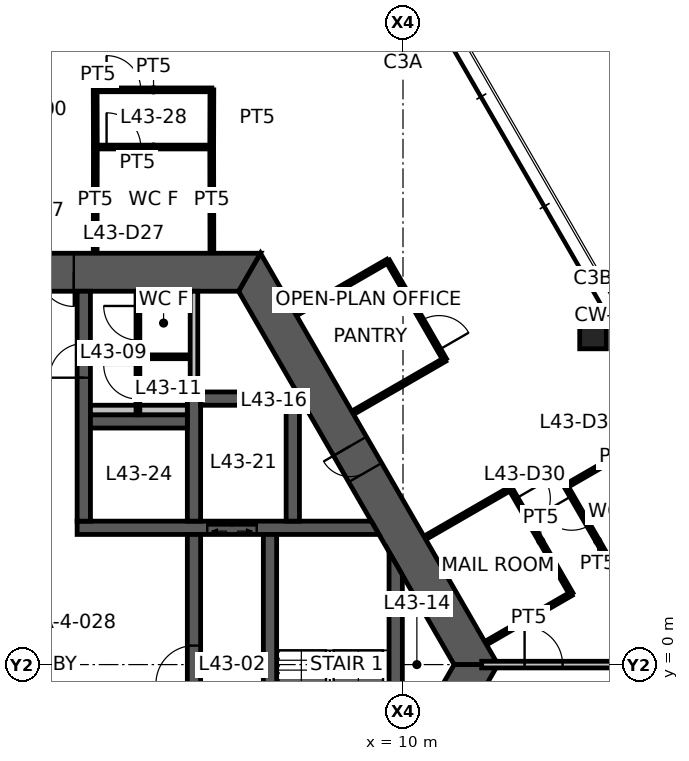
"""IFC4 building model, lengths in metres.
Left out: names, types, materials, properties, quantities, classifications, styles, units other than length and angle.
Written with IfcOpenShell. Run it as: python <this file> out.ifc"""

import sys

from ifc_helpers import new_model, si_unit, direction, frame, frame_2d, origin, origin_2d, place, context, subcontext, project, spatial, polyline, rectangle, hollow_rectangle, outline, extrude, element, fill, save


model = new_model("IFC4")
c1 = context("Model", 3, precision=1e-05, world=origin(), true_north=direction((0.0, 1.0)))
c2 = subcontext(c1, "Body", "Model", "MODEL_VIEW")
j1 = project(units=[si_unit("LENGTHUNIT", "METRE"), si_unit("PLANEANGLEUNIT", "RADIAN")], contexts=[c1])
p1 = place(None, origin())
s1 = spatial("IfcSite", under=j1, at=p1, CompositionType="ELEMENT")
p2 = place(p1, origin())
s2 = spatial("IfcBuilding", under=s1, at=p2, CompositionType="ELEMENT")
p3 = place(p2, frame((0.0, 0.0, 172.1)))
s3 = spatial("IfcBuildingStorey", under=s2, at=p3, CompositionType="ELEMENT", Elevation=172.1)
p4 = place(p3, frame((15.0, 8.66, 0.0), z_axis=(0.0, 0.0, 1.0), x_axis=(1.0, 0.0, 0.0)))
e1 = element("IfcColumn", 1, at=p4, inside=s3, PredefinedType="COLUMN", context=c2, shape_type="SweptSolid", body=[
    extrude(hollow_rectangle(XDim=0.7, YDim=0.7, WallThickness=0.036, at=origin_2d()), origin(), (0.0, 0.0, 1.0), 3.9),
])
p5 = place(p3, frame((11.922, 0.0, 0.0), z_axis=(0.0, 0.0, 1.0), x_axis=(-0.500004296715, 0.866022923061, 0.0)))
e2 = element("IfcWall", 2, at=p5, inside=s3, PredefinedType="SHEAR", context=c2, shape_type="SweptSolid", body=[
    extrude(outline(polyline([(-0.289, -0.5), (5.835, -0.5), (6.635, -0.5), (12.211, -0.5), (11.634, 0.5), (6.635, 0.5), (5.835, 0.5), (0.289, 0.5), (-0.289, -0.5)])), origin(), (0.0, 0.0, 1.0), 3.9),
])
p6 = place(p5, frame((5.835, 0.0, 0.0)))
e3 = element("IfcOpeningElement", 3, at=p6, cuts=e2, PredefinedType="OPENING", context=c2, shape_type="SweptSolid", body=[
    extrude(rectangle(XDim=0.8, YDim=2.1, at=frame_2d((0.4, 1.05))), frame((0.0, 0.51, 0.0), z_axis=(0.0, -1.0, 0.0), x_axis=(1.0, 0.0, 0.0)), (0.0, 0.0, 1.0), 1.02),
])
p7 = place(p3, frame((5.961, 10.325, 0.0), z_axis=(0.0, 0.0, 1.0), x_axis=(-1.0, 0.0, 0.0)))
e4 = element("IfcWall", 4, at=p7, inside=s3, PredefinedType="SHEAR", context=c2, shape_type="SweptSolid", body=[
    extrude(outline(polyline([(-0.289, -0.5), (4.624, -0.5), (5.523, -0.5), (6.399, -0.5), (7.299, -0.5), (12.211, -0.5), (11.634, 0.5), (7.299, 0.5), (6.399, 0.5), (5.523, 0.5), (4.624, 0.5), (0.289, 0.5), (-0.289, -0.5)])), origin(), (0.0, 0.0, 1.0), 3.9),
])
p8 = place(p7, frame((6.399, 0.0, 0.0)))
e5 = element("IfcOpeningElement", 5, at=p8, cuts=e4, PredefinedType="OPENING", context=c2, shape_type="SweptSolid", body=[
    extrude(rectangle(XDim=0.9, YDim=2.1, at=frame_2d((0.45, 1.05))), frame((0.0, 0.51, 0.0), z_axis=(0.0, -1.0, 0.0), x_axis=(1.0, 0.0, 0.0)), (0.0, 0.0, 1.0), 1.02),
])
p9 = place(p7, frame((4.624, 0.0, 0.0)))
e6 = element("IfcOpeningElement", 6, at=p9, cuts=e4, PredefinedType="OPENING", context=c2, shape_type="SweptSolid", body=[
    extrude(rectangle(XDim=0.9, YDim=2.1, at=frame_2d((0.45, 1.05))), frame((0.0, 0.51, 0.0), z_axis=(0.0, -1.0, 0.0), x_axis=(1.0, 0.0, 0.0)), (0.0, 0.0, 1.0), 1.02),
])
p10 = place(p3, frame((5.961, -10.325, 0.0), z_axis=(0.0, 0.0, 1.0), x_axis=(0.500004296715, 0.866022923061, 0.0)))
e7 = element("IfcWall", 7, at=p10, inside=s3, PredefinedType="SHEAR", context=c2, shape_type="SweptSolid", body=[
    extrude(outline(polyline([(-0.289, -0.5), (4.594, -0.5), (5.394, -0.5), (12.211, -0.5), (11.634, 0.5), (5.394, 0.5), (4.594, 0.5), (0.289, 0.5), (-0.289, -0.5)])), origin(), (0.0, 0.0, 1.0), 3.9),
])
p11 = place(p10, frame((4.594, 0.0, 0.0)))
e8 = element("IfcOpeningElement", 8, at=p11, cuts=e7, PredefinedType="OPENING", context=c2, shape_type="SweptSolid", body=[
    extrude(rectangle(XDim=0.8, YDim=2.1, at=frame_2d((0.4, 1.05))), frame((0.0, 0.51, 0.0), z_axis=(0.0, -1.0, 0.0), x_axis=(1.0, 0.0, 0.0)), (0.0, 0.0, 1.0), 1.02),
])
p12 = place(p3, frame((1.425, 3.6, 0.0), z_axis=(0.0, 0.0, 1.0), x_axis=(1.0, 0.0, 0.0)))
e9 = element("IfcWall", 9, at=p12, inside=s3, PredefinedType="SHEAR", context=c2, shape_type="SweptSolid", body=[
    extrude(outline(polyline([(0.0, -0.175), (3.425, -0.175), (4.725, -0.175), (7.942, -0.175), (7.74, 0.175), (4.725, 0.175), (3.425, 0.175), (0.0, 0.175), (0.0, -0.175)])), origin(), (0.0, 0.0, 1.0), 3.9),
])
p13 = place(p12, frame((3.425, 0.0, 0.0)))
e10 = element("IfcOpeningElement", 10, at=p13, cuts=e9, PredefinedType="OPENING", context=c2, shape_type="SweptSolid", body=[
    extrude(rectangle(XDim=1.3, YDim=2.1, at=frame_2d((0.65, 1.05))), frame((0.0, 0.185, 0.0), z_axis=(0.0, -1.0, 0.0), x_axis=(1.0, 0.0, 0.0)), (0.0, 0.0, 1.0), 0.37),
])
p14 = place(p3, frame((1.6, 3.775, 0.0), z_axis=(0.0, 0.0, 1.0), x_axis=(0.0, 1.0, 0.0)))
e11 = element("IfcWall", 11, at=p14, inside=s3, PredefinedType="SHEAR", context=c2, shape_type="SweptSolid", body=[
    extrude(rectangle(XDim=6.05, YDim=0.35, at=frame_2d((3.025, 0.0))), origin(), (0.0, 0.0, 1.0), 3.9),
])
p15 = place(p14, frame((3.775, 0.0, 0.0)))
e12 = element("IfcOpeningElement", 12, at=p15, cuts=e11, PredefinedType="OPENING", context=c2, shape_type="SweptSolid", body=[
    extrude(rectangle(XDim=0.9, YDim=2.1, at=frame_2d((0.45, 1.05))), frame((0.0, 0.185, 0.0), z_axis=(0.0, -1.0, 0.0), x_axis=(1.0, 0.0, 0.0)), (0.0, 0.0, 1.0), 0.37),
])
p16 = place(p3, frame((4.5, -3.425, 0.0), z_axis=(0.0, 0.0, 1.0), x_axis=(0.0, 1.0, 0.0)))
e13 = element("IfcWall", 13, at=p16, inside=s3, PredefinedType="SHEAR", context=c2, shape_type="SweptSolid", body=[
    extrude(rectangle(XDim=6.85, YDim=0.35, at=frame_2d((3.425, 0.0))), origin(), (0.0, 0.0, 1.0), 3.9),
])
p17 = place(p16, frame((2.925, 0.0, 0.0)))
e14 = element("IfcOpeningElement", 14, at=p17, cuts=e13, PredefinedType="OPENING", context=c2, shape_type="SweptSolid", body=[
    extrude(rectangle(XDim=1.0, YDim=2.1, at=frame_2d((0.5, 1.05))), frame((0.0, 0.185, 0.0), z_axis=(0.0, -1.0, 0.0), x_axis=(1.0, 0.0, 0.0)), (0.0, 0.0, 1.0), 0.37),
])
p18 = place(p3, frame((6.5, -3.425, 0.0), z_axis=(0.0, 0.0, 1.0), x_axis=(0.0, 1.0, 0.0)))
e15 = element("IfcWall", 15, at=p18, inside=s3, PredefinedType="SHEAR", context=c2, shape_type="SweptSolid", body=[
    extrude(rectangle(XDim=6.85, YDim=0.35, at=frame_2d((3.425, 0.0))), origin(), (0.0, 0.0, 1.0), 3.9),
])
p19 = place(p18, frame((0.1, 0.0, 0.0)))
e16 = element("IfcOpeningElement", 16, at=p19, cuts=e15, PredefinedType="OPENING", context=c2, shape_type="SweptSolid", body=[
    extrude(rectangle(XDim=1.0, YDim=2.1, at=frame_2d((0.5, 1.05))), frame((0.0, 0.185, 0.0), z_axis=(0.0, -1.0, 0.0), x_axis=(1.0, 0.0, 0.0)), (0.0, 0.0, 1.0), 0.37),
])
p20 = place(p3, frame((4.5, 3.775, 0.0), z_axis=(0.0, 0.0, 1.0), x_axis=(0.0, 1.0, 0.0)))
e17 = element("IfcWall", 17, at=p20, inside=s3, PredefinedType="SHEAR", context=c2, shape_type="SweptSolid", body=[
    extrude(rectangle(XDim=3.4, YDim=0.35, at=frame_2d((1.7, 0.0))), origin(), (0.0, 0.0, 1.0), 3.9),
])
p21 = place(p3, frame((1.775, 6.4, 0.0), z_axis=(0.0, 0.0, 1.0), x_axis=(1.0, 0.0, 0.0)))
e18 = element("IfcWall", 18, at=p21, inside=s3, PredefinedType="SHEAR", context=c2, shape_type="SweptSolid", body=[
    extrude(rectangle(XDim=2.55, YDim=0.35, at=frame_2d((1.275, 0.0))), origin(), (0.0, 0.0, 1.0), 3.9),
])
p22 = place(p3, frame((4.675, 7.0, 0.0), z_axis=(0.0, 0.0, 1.0), x_axis=(1.0, 0.0, 0.0)))
e19 = element("IfcWall", 19, at=p22, inside=s3, PredefinedType="SHEAR", context=c2, shape_type="SweptSolid", body=[
    extrude(rectangle(XDim=2.25, YDim=0.35, at=frame_2d((1.125, 0.0))), origin(), (0.0, 0.0, 1.0), 3.9),
])
p23 = place(p3, frame((7.1, 3.775, 0.0), z_axis=(0.0, 0.0, 1.0), x_axis=(0.0, 1.0, 0.0)))
e20 = element("IfcWall", 20, at=p23, inside=s3, PredefinedType="SHEAR", context=c2, shape_type="SweptSolid", body=[
    extrude(outline(polyline([(0.0, -0.175), (3.274, -0.175), (3.4, 0.0), (3.4, 0.175), (0.0, 0.175), (0.0, -0.175)])), origin(), (0.0, 0.0, 1.0), 3.9),
])
p24 = place(p3, frame((9.808, -2.662, 0.0), z_axis=(0.0, 0.0, 1.0), x_axis=(0.0, 1.0, 0.0)))
e21 = element("IfcWall", 21, at=p24, inside=s3, PredefinedType="SHEAR", context=c2, shape_type="SweptSolid", body=[
    extrude(outline(polyline([(0.303, -0.175), (5.021, -0.175), (5.628, 0.175), (-0.303, 0.175), (0.303, -0.175)])), origin(), (0.0, 0.0, 1.0), 3.9),
])
p25 = place(p3, frame((4.5, 7.175, 0.0), z_axis=(0.0, 0.0, 1.0), x_axis=(0.0, 1.0, 0.0)))
e22 = element("IfcWall", 22, at=p25, inside=s3, PredefinedType="STANDARD", context=c2, shape_type="SweptSolid", body=[
    extrude(rectangle(XDim=2.65, YDim=0.2, at=frame_2d((1.325, 0.0))), origin(), (0.0, 0.0, 1.0), 3.9),
])
p26 = place(p3, frame((1.775, 6.7, 0.0), z_axis=(0.0, 0.0, 1.0), x_axis=(1.0, 0.0, 0.0)))
e23 = element("IfcWall", 23, at=p26, inside=s3, PredefinedType="PLUMBINGWALL", context=c2, shape_type="SweptSolid", body=[
    extrude(rectangle(XDim=2.55, YDim=0.25, at=frame_2d((1.275, 0.0))), origin(), (0.0, 0.0, 1.0), 3.9),
])
p27 = place(p3, frame((3.025, 6.575, 0.0), z_axis=(0.0, 0.0, 1.0), x_axis=(0.0, 1.0, 0.0)))
e24 = element("IfcWall", 24, at=p27, inside=s3, PredefinedType="PARTITIONING", context=c2, shape_type="SweptSolid", body=[
    extrude(rectangle(XDim=3.25, YDim=0.1, at=frame_2d((1.625, 0.0))), origin(), (0.0, 0.0, 1.0), 2.95),
])
p28 = place(p27, frame((1.962, 0.0, 0.0)))
e25 = element("IfcOpeningElement", 25, at=p28, cuts=e24, PredefinedType="OPENING", context=c2, shape_type="SweptSolid", body=[
    extrude(rectangle(XDim=0.9, YDim=2.1, at=frame_2d((0.45, 1.05))), frame((0.0, 0.06, 0.0), z_axis=(0.0, -1.0, 0.0), x_axis=(1.0, 0.0, 0.0)), (0.0, 0.0, 1.0), 0.12),
])
p29 = place(p27, frame((0.413, 0.0, 0.0)))
e26 = element("IfcOpeningElement", 26, at=p29, cuts=e24, PredefinedType="OPENING", context=c2, shape_type="SweptSolid", body=[
    extrude(rectangle(XDim=0.9, YDim=2.1, at=frame_2d((0.45, 1.05))), frame((0.0, 0.06, 0.0), z_axis=(0.0, -1.0, 0.0), x_axis=(1.0, 0.0, 0.0)), (0.0, 0.0, 1.0), 0.12),
])
p30 = place(p3, frame((3.075, 8.1, 0.0), z_axis=(0.0, 0.0, 1.0), x_axis=(1.0, 0.0, 0.0)))
e27 = element("IfcWall", 27, at=p30, inside=s3, PredefinedType="PARTITIONING", context=c2, shape_type="SweptSolid", body=[
    extrude(rectangle(XDim=1.25, YDim=0.1, at=frame_2d((0.625, 0.0))), origin(), (0.0, 0.0, 1.0), 2.95),
])
p31 = place(p3, frame((12.07, 0.0, 0.0), z_axis=(0.0, 0.0, 1.0), x_axis=(1.0, 0.0, 0.0)))
e28 = element("IfcWall", 28, at=p31, inside=s3, PredefinedType="PARTITIONING", context=c2, shape_type="SweptSolid", body=[
    extrude(rectangle(XDim=7.93, YDim=0.175, at=frame_2d((3.965, 0.0))), origin(), (0.0, 0.0, 1.0), 3.05),
])
p32 = place(p31, frame((1.13, 0.0, 0.0)))
e29 = element("IfcOpeningElement", 29, at=p32, cuts=e28, PredefinedType="OPENING", context=c2, shape_type="SweptSolid", body=[
    extrude(rectangle(XDim=1.0, YDim=2.1, at=frame_2d((0.5, 1.05))), frame((0.0, 0.098, 0.0), z_axis=(0.0, -1.0, 0.0), x_axis=(1.0, 0.0, 0.0)), (0.0, 0.0, 1.0), 0.195),
])
p33 = place(p3, frame((1.9, 13.62, 0.0), z_axis=(0.0, 0.0, 1.0), x_axis=(1.0, 0.0, 0.0)))
e30 = element("IfcWall", 30, at=p33, inside=s3, PredefinedType="PARTITIONING", context=c2, shape_type="SweptSolid", body=[
    extrude(rectangle(XDim=3.071, YDim=0.1, at=frame_2d((1.536, 0.0))), origin(), (0.0, 0.0, 1.0), 2.95),
])
p34 = place(p33, frame((0.3, 0.0, 0.0)))
e31 = element("IfcOpeningElement", 31, at=p34, cuts=e30, PredefinedType="OPENING", context=c2, shape_type="SweptSolid", body=[
    extrude(rectangle(XDim=0.9, YDim=2.1, at=frame_2d((0.45, 1.05))), frame((0.0, 0.06, 0.0), z_axis=(0.0, -1.0, 0.0), x_axis=(1.0, 0.0, 0.0)), (0.0, 0.0, 1.0), 0.12),
])
for number, where, z_axis, x_axis in (
    (32, (1.9, 10.845, 0.0), (0.0, 0.0, 1.0), (0.002, 1.0, 0.0)),
    (33, (4.966, 13.625, 0.0), (0.0, 0.0, 1.0), (0.002, -1.0, 0.0)),
):
    element("IfcWall", number, at=place(p3, frame(where, z_axis=z_axis, x_axis=x_axis)), inside=s3, PredefinedType="PARTITIONING", context=c2, shape_type="SweptSolid", body=[
        extrude(rectangle(XDim=2.78, YDim=0.1, at=frame_2d((1.39, 0.0))), origin(), (0.0, 0.0, 1.0), 2.95),
    ])
p35 = place(p3, frame((1.9, 15.125, 0.0), z_axis=(0.0, 0.0, 1.0), x_axis=(1.0, 0.0, 0.0)))
e34 = element("IfcWall", 34, at=p35, inside=s3, PredefinedType="PARTITIONING", context=c2, shape_type="SweptSolid", body=[
    extrude(rectangle(XDim=3.071, YDim=0.1, at=frame_2d((1.536, 0.0))), origin(), (0.0, 0.0, 1.0), 2.95),
])
p36 = place(p35, frame((0.3, 0.0, 0.0)))
e35 = element("IfcOpeningElement", 35, at=p36, cuts=e34, PredefinedType="OPENING", context=c2, shape_type="SweptSolid", body=[
    extrude(rectangle(XDim=0.9, YDim=2.1, at=frame_2d((0.45, 1.05))), frame((0.0, 0.06, 0.0), z_axis=(0.0, -1.0, 0.0), x_axis=(1.0, 0.0, 0.0)), (0.0, 0.0, 1.0), 0.12),
])
for number, where, z_axis, x_axis in (
    (36, (1.905, 13.625, 0.0), (0.0, 0.0, 1.0), (-0.003, 1.0, 0.0)),
    (37, (4.971, 15.125, 0.0), (0.0, 0.0, 1.0), (-0.003, -1.0, 0.0)),
):
    element("IfcWall", number, at=place(p3, frame(where, z_axis=z_axis, x_axis=x_axis)), inside=s3, PredefinedType="PARTITIONING", context=c2, shape_type="SweptSolid", body=[
        extrude(rectangle(XDim=1.5, YDim=0.1, at=frame_2d((0.75, 0.0))), origin(), (0.0, 0.0, 1.0), 2.95),
    ])
p37 = place(p3, frame((7.192, 9.233, 0.0), z_axis=(0.0, 0.0, 1.0), x_axis=(0.866018876994, 0.500011304563, 0.0)))
e38 = element("IfcWall", 38, at=p37, inside=s3, PredefinedType="PARTITIONING", context=c2, shape_type="SweptSolid", body=[
    extrude(rectangle(XDim=2.78, YDim=0.1, at=frame_2d((1.39, 0.0))), origin(), (0.0, 0.0, 1.0), 2.95),
])
p38 = place(p3, frame((9.6, 10.623, 0.0), z_axis=(0.0, 0.0, 1.0), x_axis=(0.499990139034, -0.866031096941, 0.0)))
e39 = element("IfcWall", 39, at=p38, inside=s3, PredefinedType="PARTITIONING", context=c2, shape_type="SweptSolid", body=[
    extrude(rectangle(XDim=3.0, YDim=0.1, at=frame_2d((1.5, 0.0))), origin(), (0.0, 0.0, 1.0), 2.95),
])
p39 = place(p38, frame((1.8, 0.0, 0.0)))
e40 = element("IfcOpeningElement", 40, at=p39, cuts=e39, PredefinedType="OPENING", context=c2, shape_type="SweptSolid", body=[
    extrude(rectangle(XDim=0.9, YDim=2.1, at=frame_2d((0.45, 1.05))), frame((0.0, 0.06, 0.0), z_axis=(0.0, -1.0, 0.0), x_axis=(1.0, 0.0, 0.0)), (0.0, 0.0, 1.0), 0.12),
])
p40 = place(p3, frame((11.1, 8.025, 0.0), z_axis=(0.0, 0.0, 1.0), x_axis=(-0.866056901187, -0.49994544093, 0.0)))
e41 = element("IfcWall", 41, at=p40, inside=s3, PredefinedType="PARTITIONING", context=c2, shape_type="SweptSolid", body=[
    extrude(rectangle(XDim=2.78, YDim=0.1, at=frame_2d((1.39, 0.0))), origin(), (0.0, 0.0, 1.0), 2.95),
])
p41 = place(p3, frame((10.592, 3.344, 0.0), z_axis=(0.0, 0.0, 1.0), x_axis=(0.866021702275, 0.500006411147, 0.0)))
e42 = element("IfcWall", 42, at=p41, inside=s3, PredefinedType="PARTITIONING", context=c2, shape_type="SweptSolid", body=[
    extrude(rectangle(XDim=2.58, YDim=0.1, at=frame_2d((1.29, 0.0))), origin(), (0.0, 0.0, 1.0), 2.95),
])
p42 = place(p3, frame((12.826, 4.634, 0.0), z_axis=(0.0, 0.0, 1.0), x_axis=(0.500028443584, -0.866008981251, 0.0)))
e43 = element("IfcWall", 43, at=p42, inside=s3, PredefinedType="PARTITIONING", context=c2, shape_type="SweptSolid", body=[
    extrude(rectangle(XDim=3.2, YDim=0.1, at=frame_2d((1.6, 0.0))), origin(), (0.0, 0.0, 1.0), 2.95),
])
p43 = place(p42, frame((0.3, 0.0, 0.0)))
e44 = element("IfcOpeningElement", 44, at=p43, cuts=e43, PredefinedType="OPENING", context=c2, shape_type="SweptSolid", body=[
    extrude(rectangle(XDim=0.9, YDim=2.1, at=frame_2d((0.45, 1.05))), frame((0.0, 0.06, 0.0), z_axis=(0.0, -1.0, 0.0), x_axis=(1.0, 0.0, 0.0)), (0.0, 0.0, 1.0), 0.12),
])
p44 = place(p3, frame((14.427, 1.863, 0.0), z_axis=(0.0, 0.0, 1.0), x_axis=(-0.866045356598, -0.49996543912, 0.0)))
e45 = element("IfcWall", 45, at=p44, inside=s3, PredefinedType="PARTITIONING", context=c2, shape_type="SweptSolid", body=[
    extrude(rectangle(XDim=2.58, YDim=0.1, at=frame_2d((1.29, 0.0))), origin(), (0.0, 0.0, 1.0), 2.95),
])
p45 = place(p3, frame((14.287, 4.695, 0.0), z_axis=(0.0, 0.0, 1.0), x_axis=(0.866023220135, 0.500003782172, 0.0)))
e46 = element("IfcWall", 46, at=p45, inside=s3, PredefinedType="PARTITIONING", context=c2, shape_type="SweptSolid", body=[
    extrude(rectangle(XDim=3.105, YDim=0.1, at=frame_2d((1.552, 0.0))), origin(), (0.0, 0.0, 1.0), 2.95),
])
p46 = place(p3, frame((15.956, 1.813, 0.0), z_axis=(0.0, 0.0, 1.0), x_axis=(-0.501111387448, 0.865382792393, 0.0)))
e47 = element("IfcWall", 47, at=p46, inside=s3, PredefinedType="PARTITIONING", context=c2, shape_type="SweptSolid", body=[
    extrude(rectangle(XDim=3.331, YDim=0.1, at=frame_2d((1.666, 0.0))), origin(), (0.0, 0.0, 1.0), 2.95),
])
p47 = place(p46, frame((2.131, 0.0, 0.0)))
e48 = element("IfcOpeningElement", 48, at=p47, cuts=e47, PredefinedType="OPENING", context=c2, shape_type="SweptSolid", body=[
    extrude(rectangle(XDim=0.9, YDim=2.1, at=frame_2d((0.45, 1.05))), frame((0.0, 0.06, 0.0), z_axis=(0.0, -1.0, 0.0), x_axis=(1.0, 0.0, 0.0)), (0.0, 0.0, 1.0), 0.12),
])
p48 = place(p9, origin())
e49 = element("IfcDoor", 49, at=p48, inside=s3, OperationType="SINGLE_SWING_LEFT", PredefinedType="DOOR", context=c2, shape_type="SweptSolid", body=[
    extrude(rectangle(XDim=0.9, YDim=2.1, at=frame_2d((0.45, 1.05))), frame((0.0, 0.025, 0.0), z_axis=(0.0, -1.0, 0.0), x_axis=(1.0, 0.0, 0.0)), (0.0, 0.0, 1.0), 0.05),
])
fill(e6, e49)
p49 = place(p6, origin())
e50 = element("IfcDoor", 50, at=p49, inside=s3, OperationType="SINGLE_SWING_RIGHT", PredefinedType="DOOR", context=c2, shape_type="SweptSolid", body=[
    extrude(rectangle(XDim=0.8, YDim=2.1, at=frame_2d((0.4, 1.05))), frame((0.0, 0.025, 0.0), z_axis=(0.0, -1.0, 0.0), x_axis=(1.0, 0.0, 0.0)), (0.0, 0.0, 1.0), 0.05),
])
fill(e3, e50)
p50 = place(p17, origin())
e51 = element("IfcDoor", 51, at=p50, inside=s3, OperationType="SINGLE_SWING_LEFT", PredefinedType="DOOR", context=c2, shape_type="SweptSolid", body=[
    extrude(rectangle(XDim=1.0, YDim=2.1, at=frame_2d((0.5, 1.05))), frame((0.0, 0.025, 0.0), z_axis=(0.0, -1.0, 0.0), x_axis=(1.0, 0.0, 0.0)), (0.0, 0.0, 1.0), 0.05),
])
fill(e14, e51)
p51 = place(p15, origin())
e52 = element("IfcDoor", 52, at=p51, inside=s3, OperationType="SINGLE_SWING_LEFT", PredefinedType="DOOR", context=c2, shape_type="SweptSolid", body=[
    extrude(rectangle(XDim=0.9, YDim=2.1, at=frame_2d((0.45, 1.05))), frame((0.0, 0.025, 0.0), z_axis=(0.0, -1.0, 0.0), x_axis=(1.0, 0.0, 0.0)), (0.0, 0.0, 1.0), 0.05),
])
fill(e12, e52)
p52 = place(p28, origin())
e53 = element("IfcDoor", 53, at=p52, inside=s3, OperationType="SINGLE_SWING_RIGHT", PredefinedType="DOOR", context=c2, shape_type="SweptSolid", body=[
    extrude(rectangle(XDim=0.9, YDim=2.1, at=frame_2d((0.45, 1.05))), frame((0.0, 0.025, 0.0), z_axis=(0.0, -1.0, 0.0), x_axis=(1.0, 0.0, 0.0)), (0.0, 0.0, 1.0), 0.05),
])
fill(e25, e53)
p53 = place(p29, origin())
e54 = element("IfcDoor", 54, at=p53, inside=s3, OperationType="SINGLE_SWING_RIGHT", PredefinedType="DOOR", context=c2, shape_type="SweptSolid", body=[
    extrude(rectangle(XDim=0.9, YDim=2.1, at=frame_2d((0.45, 1.05))), frame((0.0, 0.025, 0.0), z_axis=(0.0, -1.0, 0.0), x_axis=(1.0, 0.0, 0.0)), (0.0, 0.0, 1.0), 0.05),
])
fill(e26, e54)
p54 = place(p32, origin())
e55 = element("IfcDoor", 55, at=p54, inside=s3, OperationType="SINGLE_SWING_LEFT", PredefinedType="DOOR", context=c2, shape_type="SweptSolid", body=[
    extrude(rectangle(XDim=1.0, YDim=2.1, at=frame_2d((0.5, 1.05))), frame((0.0, 0.025, 0.0), z_axis=(0.0, -1.0, 0.0), x_axis=(1.0, 0.0, 0.0)), (0.0, 0.0, 1.0), 0.05),
])
fill(e29, e55)
p55 = place(p34, origin())
e56 = element("IfcDoor", 56, at=p55, inside=s3, OperationType="SINGLE_SWING_LEFT", PredefinedType="DOOR", context=c2, shape_type="SweptSolid", body=[
    extrude(rectangle(XDim=0.9, YDim=2.1, at=frame_2d((0.45, 1.05))), frame((0.0, 0.025, 0.0), z_axis=(0.0, -1.0, 0.0), x_axis=(1.0, 0.0, 0.0)), (0.0, 0.0, 1.0), 0.05),
])
fill(e31, e56)
p56 = place(p36, origin())
e57 = element("IfcDoor", 57, at=p56, inside=s3, OperationType="SINGLE_SWING_LEFT", PredefinedType="DOOR", context=c2, shape_type="SweptSolid", body=[
    extrude(rectangle(XDim=0.9, YDim=2.1, at=frame_2d((0.45, 1.05))), frame((0.0, 0.025, 0.0), z_axis=(0.0, -1.0, 0.0), x_axis=(1.0, 0.0, 0.0)), (0.0, 0.0, 1.0), 0.05),
])
fill(e35, e57)
p57 = place(p39, origin())
e58 = element("IfcDoor", 58, at=p57, inside=s3, OperationType="SINGLE_SWING_RIGHT", PredefinedType="DOOR", context=c2, shape_type="SweptSolid", body=[
    extrude(rectangle(XDim=0.9, YDim=2.1, at=frame_2d((0.45, 1.05))), frame((0.0, 0.025, 0.0), z_axis=(0.0, -1.0, 0.0), x_axis=(1.0, 0.0, 0.0)), (0.0, 0.0, 1.0), 0.05),
])
fill(e40, e58)
p58 = place(p43, origin())
e59 = element("IfcDoor", 59, at=p58, inside=s3, OperationType="SINGLE_SWING_LEFT", PredefinedType="DOOR", context=c2, shape_type="SweptSolid", body=[
    extrude(rectangle(XDim=0.9, YDim=2.1, at=frame_2d((0.45, 1.05))), frame((0.0, 0.025, 0.0), z_axis=(0.0, -1.0, 0.0), x_axis=(1.0, 0.0, 0.0)), (0.0, 0.0, 1.0), 0.05),
])
fill(e44, e59)
p59 = place(p47, origin())
e60 = element("IfcDoor", 60, at=p59, inside=s3, OperationType="SINGLE_SWING_RIGHT", PredefinedType="DOOR", context=c2, shape_type="SweptSolid", body=[
    extrude(rectangle(XDim=0.9, YDim=2.1, at=frame_2d((0.45, 1.05))), frame((0.0, 0.025, 0.0), z_axis=(0.0, -1.0, 0.0), x_axis=(1.0, 0.0, 0.0)), (0.0, 0.0, 1.0), 0.05),
])
fill(e48, e60)
p60 = place(p13, origin())
e61 = element("IfcDoor", 61, at=p60, inside=s3, OperationType="DOUBLE_DOOR_SLIDING", PredefinedType="DOOR", context=c2, shape_type="SweptSolid", body=[
    extrude(rectangle(XDim=1.3, YDim=2.1, at=frame_2d((0.65, 1.05))), frame((0.0, 0.025, 0.0), z_axis=(0.0, -1.0, 0.0), x_axis=(1.0, 0.0, 0.0)), (0.0, 0.0, 1.0), 0.05),
])
fill(e10, e61)
save(model, sys.argv[1])
